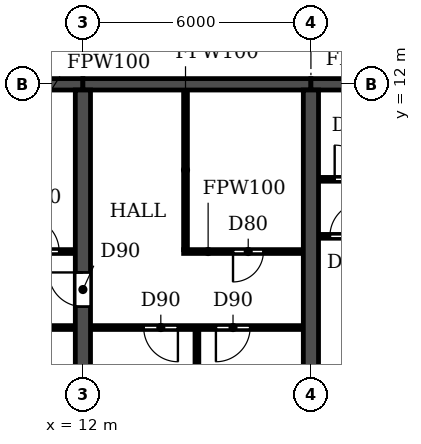
"""IFC4 building model, lengths in metres.
Left out: names, types, materials, properties, quantities, classifications, styles, units other than length and angle.
Written with IfcOpenShell. Run it as: python <this file> out.ifc"""

import sys

from ifc_helpers import new_model, si_unit, direction, frame, frame_2d, origin, place, context, subcontext, project, spatial, rectangle, extrude, element, fill, save


model = new_model("IFC4")
c1 = context("Model", 3, precision=1e-05, world=origin(), true_north=direction((0.0, 1.0)))
c2 = subcontext(c1, "Body", "Model", "MODEL_VIEW")
j1 = project(units=[si_unit("LENGTHUNIT", "METRE"), si_unit("PLANEANGLEUNIT", "RADIAN")], contexts=[c1])
p1 = place(None, origin())
s1 = spatial("IfcSite", under=j1, at=p1, CompositionType="ELEMENT")
p2 = place(p1, origin())
s2 = spatial("IfcBuilding", under=s1, at=p2, CompositionType="ELEMENT")
p3 = place(p2, frame((0.0, 0.0, 26.7)))
s3 = spatial("IfcBuildingStorey", under=s2, at=p3, CompositionType="ELEMENT", Elevation=26.7)
p4 = place(p3, frame((12.0, 0.2, 0.0), z_axis=(0.0, 0.0, 1.0), x_axis=(0.0, 1.0, 0.0)))
e1 = element("IfcWall", 1, at=p4, inside=s3, PredefinedType="SHEAR", context=c2, shape_type="SweptSolid", body=[
    extrude(rectangle(XDim=11.65, YDim=0.4, at=frame_2d((5.825, 0.0))), origin(), (0.0, 0.0, 1.0), 3.05),
])
p5 = place(p4, frame((5.95, 0.0, 0.0)))
e2 = element("IfcOpeningElement", 2, at=p5, cuts=e1, PredefinedType="OPENING", context=c2, shape_type="SweptSolid", body=[
    extrude(rectangle(XDim=0.9, YDim=2.1, at=frame_2d((0.45, 1.05))), frame((0.0, 0.21, 0.0), z_axis=(0.0, -1.0, 0.0), x_axis=(1.0, 0.0, 0.0)), (0.0, 0.0, 1.0), 0.42),
])
p6 = place(p3, frame((18.0, 0.2, 0.0), z_axis=(0.0, 0.0, 1.0), x_axis=(0.0, 1.0, 0.0)))
e3 = element("IfcWall", 3, at=p6, inside=s3, PredefinedType="SHEAR", context=c2, shape_type="SweptSolid", body=[
    extrude(rectangle(XDim=11.65, YDim=0.4, at=frame_2d((5.825, 0.0))), origin(), (0.0, 0.0, 1.0), 3.05),
])
p7 = place(p3, frame((6.0, 12.0, 0.0), z_axis=(0.0, 0.0, 1.0), x_axis=(1.0, 0.0, 0.0)))
e4 = element("IfcWall", 4, at=p7, inside=s3, PredefinedType="SHEAR", context=c2, shape_type="SweptSolid", body=[
    extrude(rectangle(XDim=6.0, YDim=0.3, at=frame_2d((3.0, 0.0))), origin(), (0.0, 0.0, 1.0), 2.45),
])
p8 = place(p7, frame((2.45, 0.0, 0.0)))
e5 = element("IfcOpeningElement", 5, at=p8, cuts=e4, PredefinedType="OPENING", context=c2, shape_type="SweptSolid", body=[
    extrude(rectangle(XDim=1.0, YDim=2.1, at=frame_2d((0.5, 1.05))), frame((0.0, 0.16, 0.0), z_axis=(0.0, -1.0, 0.0), x_axis=(1.0, 0.0, 0.0)), (0.0, 0.0, 1.0), 0.32),
])
p9 = place(p3, frame((12.0, 12.0, 0.0), z_axis=(0.0, 0.0, 1.0), x_axis=(1.0, 0.0, 0.0)))
e6 = element("IfcWall", 6, at=p9, inside=s3, PredefinedType="SHEAR", context=c2, shape_type="SweptSolid", body=[
    extrude(rectangle(XDim=6.0, YDim=0.3, at=frame_2d((3.0, 0.0))), origin(), (0.0, 0.0, 1.0), 2.45),
])
p10 = place(p3, frame((18.0, 12.0, 0.0), z_axis=(0.0, 0.0, 1.0), x_axis=(1.0, 0.0, 0.0)))
e7 = element("IfcWall", 7, at=p10, inside=s3, PredefinedType="SHEAR", context=c2, shape_type="SweptSolid", body=[
    extrude(rectangle(XDim=6.0, YDim=0.3, at=frame_2d((3.0, 0.0))), origin(), (0.0, 0.0, 1.0), 2.45),
])
p11 = place(p10, frame((2.55, 0.0, 0.0)))
e8 = element("IfcOpeningElement", 8, at=p11, cuts=e7, PredefinedType="OPENING", context=c2, shape_type="SweptSolid", body=[
    extrude(rectangle(XDim=1.0, YDim=2.1, at=frame_2d((0.5, 1.05))), frame((0.0, 0.16, 0.0), z_axis=(0.0, -1.0, 0.0), x_axis=(1.0, 0.0, 0.0)), (0.0, 0.0, 1.0), 0.32),
])
p12 = place(p3, frame((8.95, 5.6, 0.0), z_axis=(0.0, 0.0, 1.0), x_axis=(1.0, 0.0, 0.0)))
e9 = element("IfcWall", 9, at=p12, inside=s3, PredefinedType="PARTITIONING", context=c2, shape_type="SweptSolid", body=[
    extrude(rectangle(XDim=2.84, YDim=0.1, at=frame_2d((1.42, 0.0))), origin(), (0.0, 0.0, 1.0), 3.05),
])
p13 = place(p12, frame((0.55, 0.0, 0.0)))
e10 = element("IfcOpeningElement", 10, at=p13, cuts=e9, PredefinedType="OPENING", context=c2, shape_type="SweptSolid", body=[
    extrude(rectangle(XDim=0.9, YDim=2.1, at=frame_2d((0.45, 1.05))), frame((0.0, 0.06, 0.0), z_axis=(0.0, -1.0, 0.0), x_axis=(1.0, 0.0, 0.0)), (0.0, 0.0, 1.0), 0.12),
])
p14 = place(p3, frame((12.21, 5.6, 0.0), z_axis=(0.0, 0.0, 1.0), x_axis=(1.0, 0.0, 0.0)))
e11 = element("IfcWall", 11, at=p14, inside=s3, PredefinedType="PARTITIONING", context=c2, shape_type="SweptSolid", body=[
    extrude(rectangle(XDim=5.58, YDim=0.1, at=frame_2d((2.79, 0.0))), origin(), (0.0, 0.0, 1.0), 3.05),
])
p15 = place(p14, frame((1.39, 0.0, 0.0)))
e12 = element("IfcOpeningElement", 12, at=p15, cuts=e11, PredefinedType="OPENING", context=c2, shape_type="SweptSolid", body=[
    extrude(rectangle(XDim=0.9, YDim=2.1, at=frame_2d((0.45, 1.05))), frame((0.0, 0.06, 0.0), z_axis=(0.0, -1.0, 0.0), x_axis=(1.0, 0.0, 0.0)), (0.0, 0.0, 1.0), 0.12),
])
p16 = place(p14, frame((3.29, 0.0, 0.0)))
e13 = element("IfcOpeningElement", 13, at=p16, cuts=e11, PredefinedType="OPENING", context=c2, shape_type="SweptSolid", body=[
    extrude(rectangle(XDim=0.9, YDim=2.1, at=frame_2d((0.45, 1.05))), frame((0.0, 0.06, 0.0), z_axis=(0.0, -1.0, 0.0), x_axis=(1.0, 0.0, 0.0)), (0.0, 0.0, 1.0), 0.12),
])
p17 = place(p3, frame((9.8, 7.6, 0.0), z_axis=(0.0, 0.0, 1.0), x_axis=(1.0, 0.0, 0.0)))
e14 = element("IfcWall", 14, at=p17, inside=s3, PredefinedType="PARTITIONING", context=c2, shape_type="SweptSolid", body=[
    extrude(rectangle(XDim=1.99, YDim=0.1, at=frame_2d((0.995, 0.0))), origin(), (0.0, 0.0, 1.0), 3.05),
])
p18 = place(p17, frame((0.675, 0.0, 0.0)))
e15 = element("IfcOpeningElement", 15, at=p18, cuts=e14, PredefinedType="OPENING", context=c2, shape_type="SweptSolid", body=[
    extrude(rectangle(XDim=0.9, YDim=2.1, at=frame_2d((0.45, 1.05))), frame((0.0, 0.06, 0.0), z_axis=(0.0, -1.0, 0.0), x_axis=(1.0, 0.0, 0.0)), (0.0, 0.0, 1.0), 0.12),
])
p19 = place(p3, frame((14.65, 7.6, 0.0), z_axis=(0.0, 0.0, 1.0), x_axis=(1.0, 0.0, 0.0)))
e16 = element("IfcWall", 16, at=p19, inside=s3, PredefinedType="PARTITIONING", context=c2, shape_type="SweptSolid", body=[
    extrude(rectangle(XDim=3.14, YDim=0.1, at=frame_2d((1.57, 0.0))), origin(), (0.0, 0.0, 1.0), 3.05),
])
p20 = place(p19, frame((1.3, 0.0, 0.0)))
e17 = element("IfcOpeningElement", 17, at=p20, cuts=e16, PredefinedType="OPENING", context=c2, shape_type="SweptSolid", body=[
    extrude(rectangle(XDim=0.8, YDim=2.1, at=frame_2d((0.4, 1.05))), frame((0.0, 0.06, 0.0), z_axis=(0.0, -1.0, 0.0), x_axis=(1.0, 0.0, 0.0)), (0.0, 0.0, 1.0), 0.12),
])
p21 = place(p3, frame((18.21, 8.0, 0.0), z_axis=(0.0, 0.0, 1.0), x_axis=(1.0, 0.0, 0.0)))
e18 = element("IfcWall", 18, at=p21, inside=s3, PredefinedType="PARTITIONING", context=c2, shape_type="SweptSolid", body=[
    extrude(rectangle(XDim=2.84, YDim=0.1, at=frame_2d((1.42, 0.0))), origin(), (0.0, 0.0, 1.0), 3.05),
])
p22 = place(p21, frame((0.29, 0.0, 0.0)))
e19 = element("IfcOpeningElement", 19, at=p22, cuts=e18, PredefinedType="OPENING", context=c2, shape_type="SweptSolid", body=[
    extrude(rectangle(XDim=0.9, YDim=2.1, at=frame_2d((0.45, 1.05))), frame((0.0, 0.06, 0.0), z_axis=(0.0, -1.0, 0.0), x_axis=(1.0, 0.0, 0.0)), (0.0, 0.0, 1.0), 0.12),
])
p23 = place(p3, frame((18.21, 9.5, 0.0), z_axis=(0.0, 0.0, 1.0), x_axis=(1.0, 0.0, 0.0)))
e20 = element("IfcWall", 20, at=p23, inside=s3, PredefinedType="PARTITIONING", context=c2, shape_type="SweptSolid", body=[
    extrude(rectangle(XDim=1.99, YDim=0.1, at=frame_2d((0.995, 0.0))), origin(), (0.0, 0.0, 1.0), 3.05),
])
p24 = place(p23, frame((0.415, 0.0, 0.0)))
e21 = element("IfcOpeningElement", 21, at=p24, cuts=e20, PredefinedType="OPENING", context=c2, shape_type="SweptSolid", body=[
    extrude(rectangle(XDim=0.9, YDim=2.1, at=frame_2d((0.45, 1.05))), frame((0.0, 0.06, 0.0), z_axis=(0.0, -1.0, 0.0), x_axis=(1.0, 0.0, 0.0)), (0.0, 0.0, 1.0), 0.12),
])
p25 = place(p3, frame((14.7, 7.65, 0.0), z_axis=(0.0, 0.0, 1.0), x_axis=(0.0, 1.0, 0.0)))
e22 = element("IfcWall", 22, at=p25, inside=s3, PredefinedType="PARTITIONING", context=c2, shape_type="SweptSolid", body=[
    extrude(rectangle(XDim=4.19, YDim=0.1, at=frame_2d((2.095, 0.0))), origin(), (0.0, 0.0, 1.0), 3.05),
])
p26 = place(p3, frame((15.0, 0.06, 0.0), z_axis=(0.0, 0.0, 1.0), x_axis=(0.0, 1.0, 0.0)))
e23 = element("IfcWall", 23, at=p26, inside=s3, PredefinedType="PARTITIONING", context=c2, shape_type="SweptSolid", body=[
    extrude(rectangle(XDim=5.49, YDim=0.1, at=frame_2d((2.745, 0.0))), origin(), (0.0, 0.0, 1.0), 3.05),
])
p27 = place(p15, frame((0.9, 0.0, 0.0), z_axis=(0.0, 0.0, 1.0), x_axis=(-1.0, 0.0, 0.0)))
e24 = element("IfcDoor", 24, at=p27, inside=s3, OperationType="SINGLE_SWING_LEFT", PredefinedType="DOOR", context=c2, shape_type="SweptSolid", body=[
    extrude(rectangle(XDim=0.9, YDim=2.1, at=frame_2d((0.45, 1.05))), frame((0.0, 0.025, 0.0), z_axis=(0.0, -1.0, 0.0), x_axis=(1.0, 0.0, 0.0)), (0.0, 0.0, 1.0), 0.05),
])
fill(e12, e24)
p28 = place(p16, frame((0.9, 0.0, 0.0), z_axis=(0.0, 0.0, 1.0), x_axis=(-1.0, 0.0, 0.0)))
e25 = element("IfcDoor", 25, at=p28, inside=s3, OperationType="SINGLE_SWING_RIGHT", PredefinedType="DOOR", context=c2, shape_type="SweptSolid", body=[
    extrude(rectangle(XDim=0.9, YDim=2.1, at=frame_2d((0.45, 1.05))), frame((0.0, 0.025, 0.0), z_axis=(0.0, -1.0, 0.0), x_axis=(1.0, 0.0, 0.0)), (0.0, 0.0, 1.0), 0.05),
])
fill(e13, e25)
p29 = place(p20, frame((0.8, 0.0, 0.0), z_axis=(0.0, 0.0, 1.0), x_axis=(-1.0, 0.0, 0.0)))
e26 = element("IfcDoor", 26, at=p29, inside=s3, OperationType="SINGLE_SWING_RIGHT", PredefinedType="DOOR", context=c2, shape_type="SweptSolid", body=[
    extrude(rectangle(XDim=0.8, YDim=2.1, at=frame_2d((0.4, 1.05))), frame((0.0, 0.025, 0.0), z_axis=(0.0, -1.0, 0.0), x_axis=(1.0, 0.0, 0.0)), (0.0, 0.0, 1.0), 0.05),
])
fill(e17, e26)
p30 = place(p18, origin())
e27 = element("IfcDoor", 27, at=p30, inside=s3, OperationType="SINGLE_SWING_LEFT", PredefinedType="DOOR", context=c2, shape_type="SweptSolid", body=[
    extrude(rectangle(XDim=0.9, YDim=2.1, at=frame_2d((0.45, 1.05))), frame((0.0, 0.025, 0.0), z_axis=(0.0, -1.0, 0.0), x_axis=(1.0, 0.0, 0.0)), (0.0, 0.0, 1.0), 0.05),
])
fill(e15, e27)
p31 = place(p5, origin())
e28 = element("IfcDoor", 28, at=p31, inside=s3, OperationType="SINGLE_SWING_RIGHT", PredefinedType="DOOR", context=c2, shape_type="SweptSolid", body=[
    extrude(rectangle(XDim=0.9, YDim=2.1, at=frame_2d((0.45, 1.05))), frame((0.0, 0.025, 0.0), z_axis=(0.0, -1.0, 0.0), x_axis=(1.0, 0.0, 0.0)), (0.0, 0.0, 1.0), 0.05),
])
fill(e2, e28)
p32 = place(p22, origin())
e29 = element("IfcDoor", 29, at=p32, inside=s3, OperationType="SINGLE_SWING_RIGHT", PredefinedType="DOOR", context=c2, shape_type="SweptSolid", body=[
    extrude(rectangle(XDim=0.9, YDim=2.1, at=frame_2d((0.45, 1.05))), frame((0.0, 0.025, 0.0), z_axis=(0.0, -1.0, 0.0), x_axis=(1.0, 0.0, 0.0)), (0.0, 0.0, 1.0), 0.05),
])
fill(e19, e29)
p33 = place(p24, origin())
e30 = element("IfcDoor", 30, at=p33, inside=s3, OperationType="SINGLE_SWING_LEFT", PredefinedType="DOOR", context=c2, shape_type="SweptSolid", body=[
    extrude(rectangle(XDim=0.9, YDim=2.1, at=frame_2d((0.45, 1.05))), frame((0.0, 0.025, 0.0), z_axis=(0.0, -1.0, 0.0), x_axis=(1.0, 0.0, 0.0)), (0.0, 0.0, 1.0), 0.05),
])
fill(e21, e30)
save(model, sys.argv[1])
